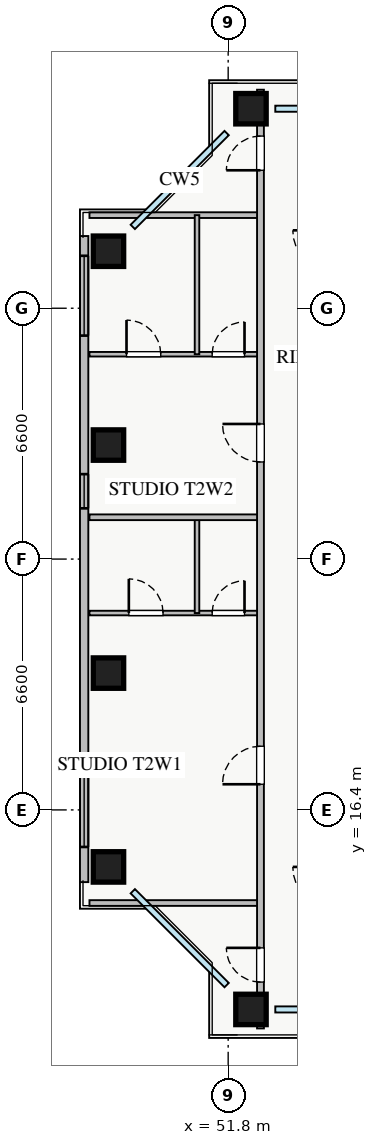
"""IFC4 building model, lengths in metres.
Left out: names, types, materials, properties, quantities, classifications, styles, units other than length and angle.
Written with IfcOpenShell. Run it as: python <this file> out.ifc"""

import sys

from ifc_helpers import new_model, si_unit, direction, frame, frame_2d, origin, origin_2d, place, context, subcontext, project, spatial, rectangle, extrude, source, transform, mapped, element, fill, save


model = new_model("IFC4")
c1 = context("Model", 3, precision=1e-05, world=origin(), true_north=direction((0.0, 1.0)))
c2 = subcontext(c1, "Body", "Model", "MODEL_VIEW")
j1 = project(units=[si_unit("LENGTHUNIT", "METRE"), si_unit("PLANEANGLEUNIT", "RADIAN")], contexts=[c1])
p1 = place(None, origin())
s1 = spatial("IfcSite", under=j1, at=p1, CompositionType="ELEMENT")
p2 = place(p1, origin())
s2 = spatial("IfcBuilding", under=s1, at=p2, CompositionType="ELEMENT")
p3 = place(p2, frame((0.0, 0.0, 103.5)))
s3 = spatial("IfcBuildingStorey", under=s2, at=p3, CompositionType="ELEMENT", Elevation=103.5)
m1 = source(origin(), c2, "Body", "SweptSolid", [
    extrude(rectangle(XDim=0.8, YDim=0.8, at=origin_2d()), origin(), (0.0, 0.0, 1.0), 3.25),
])
for number, where, z_axis, x_axis in (
    (1, (52.4, 11.15, 0.0), (0.0, 0.0, 1.0), (1.0, 0.0, 0.0)),
    (2, (52.4, 34.85, 0.0), (0.0, 0.0, 1.0), (1.0, 0.0, 0.0)),
    (3, (48.65, 14.9, 0.0), (0.0, 0.0, 1.0), (1.0, 0.0, 0.0)),
    (4, (48.65, 20.0, 0.0), (0.0, 0.0, 1.0), (1.0, 0.0, 0.0)),
    (5, (48.65, 26.0, 0.0), (0.0, 0.0, 1.0), (1.0, 0.0, 0.0)),
    (6, (48.65, 31.1, 0.0), (0.0, 0.0, 1.0), (1.0, 0.0, 0.0)),
):
    element("IfcColumn", number, at=place(p3, frame(where, z_axis=z_axis, x_axis=x_axis)), inside=s3, PredefinedType="COLUMN", context=c2, shape_type="MappedRepresentation", body=[
        mapped(m1, transform((0.0, 0.0, 0.0), x_axis=(1.0, 0.0, 0.0), y_axis=(0.0, 1.0, 0.0), z_axis=(0.0, 0.0, 1.0), scale=1.0)),
    ])
p4 = place(p3, frame((48.01, 14.5, 0.0), z_axis=(0.0, 0.0, 1.0), x_axis=(0.0, 1.0, 0.0)))
e7 = element("IfcWall", 7, at=p4, inside=s3, PredefinedType="STANDARD", context=c2, shape_type="SweptSolid", body=[
    extrude(rectangle(XDim=17.0, YDim=0.22, at=frame_2d((8.5, 0.0))), origin(), (0.0, 0.0, 1.0), 2.61),
])
p5 = place(p4, frame((0.925, 0.0, 0.9)))
e8 = element("IfcOpeningElement", 8, at=p5, cuts=e7, PredefinedType="OPENING", context=c2, shape_type="SweptSolid", body=[
    extrude(rectangle(XDim=2.4, YDim=1.48, at=frame_2d((1.2, 0.74))), frame((0.0, 0.12, 0.0), z_axis=(0.0, -1.0, 0.0), x_axis=(1.0, 0.0, 0.0)), (0.0, 0.0, 1.0), 0.24),
])
p6 = place(p4, frame((14.38, 0.0, 0.9)))
e9 = element("IfcOpeningElement", 9, at=p6, cuts=e7, PredefinedType="OPENING", context=c2, shape_type="SweptSolid", body=[
    extrude(rectangle(XDim=2.1, YDim=1.5, at=frame_2d((1.05, 0.75))), frame((0.0, 0.12, 0.0), z_axis=(0.0, -1.0, 0.0), x_axis=(1.0, 0.0, 0.0)), (0.0, 0.0, 1.0), 0.24),
])
p7 = place(p4, frame((9.835, 0.0, 0.9)))
e10 = element("IfcOpeningElement", 10, at=p7, cuts=e7, PredefinedType="OPENING", context=c2, shape_type="SweptSolid", body=[
    extrude(rectangle(XDim=0.9, YDim=1.2, at=frame_2d((0.45, 0.6))), frame((0.0, 0.12, 0.0), z_axis=(0.0, -1.0, 0.0), x_axis=(1.0, 0.0, 0.0)), (0.0, 0.0, 1.0), 0.24),
])
for number, where, z_axis, x_axis in (
    (11, (48.15, 32.05, 0.0), (0.0, 0.0, 1.0), (1.0, 0.0, 0.0)),
    (12, (48.15, 13.95, 0.0), (0.0, 0.0, 1.0), (1.0, 0.0, 0.0)),
):
    element("IfcWall", number, at=place(p3, frame(where, z_axis=z_axis, x_axis=x_axis)), inside=s3, PredefinedType="PARTITIONING", context=c2, shape_type="SweptSolid", body=[
        extrude(rectangle(XDim=4.5, YDim=0.15, at=frame_2d((2.25, 0.0))), origin(), (0.0, 0.0, 1.0), 3.07),
    ])
p8 = place(p3, frame((48.15, 21.58, 0.0), z_axis=(0.0, 0.0, 1.0), x_axis=(1.0, 0.0, 0.0)))
e13 = element("IfcWall", 13, at=p8, inside=s3, PredefinedType="PLUMBINGWALL", context=c2, shape_type="SweptSolid", body=[
    extrude(rectangle(XDim=4.5, YDim=0.12, at=frame_2d((2.25, 0.0))), origin(), (0.0, 0.0, 1.0), 3.07),
])
p9 = place(p8, frame((1.036, 0.0, 0.0)))
e14 = element("IfcOpeningElement", 14, at=p9, cuts=e13, PredefinedType="OPENING", context=c2, shape_type="SweptSolid", body=[
    extrude(rectangle(XDim=0.9, YDim=2.05, at=frame_2d((0.45, 1.025))), frame((0.0, 0.07, 0.0), z_axis=(0.0, -1.0, 0.0), x_axis=(1.0, 0.0, 0.0)), (0.0, 0.0, 1.0), 0.14),
])
p10 = place(p8, frame((3.23, 0.0, 0.0)))
e15 = element("IfcOpeningElement", 15, at=p10, cuts=e13, PredefinedType="OPENING", context=c2, shape_type="SweptSolid", body=[
    extrude(rectangle(XDim=0.85, YDim=2.05, at=frame_2d((0.425, 1.025))), frame((0.0, 0.07, 0.0), z_axis=(0.0, -1.0, 0.0), x_axis=(1.0, 0.0, 0.0)), (0.0, 0.0, 1.0), 0.14),
])
p11 = place(p3, frame((50.98, 21.58, 0.0), z_axis=(0.0, 0.0, 1.0), x_axis=(0.0, 1.0, 0.0)))
e16 = element("IfcWall", 16, at=p11, inside=s3, PredefinedType="PLUMBINGWALL", context=c2, shape_type="SweptSolid", body=[
    extrude(rectangle(XDim=2.52, YDim=0.12, at=frame_2d((1.26, 0.0))), origin(), (0.0, 0.0, 1.0), 3.07),
])
p12 = place(p3, frame((48.15, 28.39, 0.0), z_axis=(0.0, 0.0, 1.0), x_axis=(1.0, 0.0, 0.0)))
e17 = element("IfcWall", 17, at=p12, inside=s3, PredefinedType="PLUMBINGWALL", context=c2, shape_type="SweptSolid", body=[
    extrude(rectangle(XDim=4.5, YDim=0.12, at=frame_2d((2.25, 0.0))), origin(), (0.0, 0.0, 1.0), 3.07),
])
p13 = place(p12, frame((0.975, 0.0, 0.0)))
e18 = element("IfcOpeningElement", 18, at=p13, cuts=e17, PredefinedType="OPENING", context=c2, shape_type="SweptSolid", body=[
    extrude(rectangle(XDim=0.9, YDim=2.05, at=frame_2d((0.45, 1.025))), frame((0.0, 0.07, 0.0), z_axis=(0.0, -1.0, 0.0), x_axis=(1.0, 0.0, 0.0)), (0.0, 0.0, 1.0), 0.14),
])
p14 = place(p12, frame((3.23, 0.0, 0.0)))
e19 = element("IfcOpeningElement", 19, at=p14, cuts=e17, PredefinedType="OPENING", context=c2, shape_type="SweptSolid", body=[
    extrude(rectangle(XDim=0.85, YDim=2.05, at=frame_2d((0.425, 1.025))), frame((0.0, 0.07, 0.0), z_axis=(0.0, -1.0, 0.0), x_axis=(1.0, 0.0, 0.0)), (0.0, 0.0, 1.0), 0.14),
])
p15 = place(p3, frame((50.98, 28.39, 0.0), z_axis=(0.0, 0.0, 1.0), x_axis=(0.0, 1.0, 0.0)))
e20 = element("IfcWall", 20, at=p15, inside=s3, PredefinedType="PLUMBINGWALL", context=c2, shape_type="SweptSolid", body=[
    extrude(rectangle(XDim=3.66, YDim=0.12, at=frame_2d((1.83, 0.0))), origin(), (0.0, 0.0, 1.0), 3.07),
])
p16 = place(p3, frame((48.15, 24.1, 0.0), z_axis=(0.0, 0.0, 1.0), x_axis=(1.0, 0.0, 0.0)))
e21 = element("IfcWall", 21, at=p16, inside=s3, PredefinedType="PARTITIONING", context=c2, shape_type="SweptSolid", body=[
    extrude(rectangle(XDim=4.5, YDim=0.15, at=frame_2d((2.25, 0.0))), origin(), (0.0, 0.0, 1.0), 3.07),
])
p17 = place(p3, frame((52.65, 10.65, 0.0), z_axis=(0.0, 0.0, 1.0), x_axis=(0.0, 1.0, 0.0)))
e22 = element("IfcWall", 22, at=p17, inside=s3, PredefinedType="PARTITIONING", context=c2, shape_type="SweptSolid", body=[
    extrude(rectangle(XDim=24.7, YDim=0.18, at=frame_2d((12.35, 0.0))), origin(), (0.0, 0.0, 1.0), 2.615),
])
p18 = place(p17, frame((22.58, 0.0, 0.0)))
e23 = element("IfcOpeningElement", 23, at=p18, cuts=e22, PredefinedType="OPENING", context=c2, shape_type="SweptSolid", body=[
    extrude(rectangle(XDim=0.9, YDim=2.05, at=frame_2d((0.45, 1.025))), frame((0.0, 0.1, 0.0), z_axis=(0.0, -1.0, 0.0), x_axis=(1.0, 0.0, 0.0)), (0.0, 0.0, 1.0), 0.2),
])
p19 = place(p17, frame((1.22, 0.0, 0.0)))
e24 = element("IfcOpeningElement", 24, at=p19, cuts=e22, PredefinedType="OPENING", context=c2, shape_type="SweptSolid", body=[
    extrude(rectangle(XDim=0.9, YDim=2.05, at=frame_2d((0.45, 1.025))), frame((0.0, 0.1, 0.0), z_axis=(0.0, -1.0, 0.0), x_axis=(1.0, 0.0, 0.0)), (0.0, 0.0, 1.0), 0.2),
])
p20 = place(p17, frame((6.425, 0.0, 0.0)))
e25 = element("IfcOpeningElement", 25, at=p20, cuts=e22, PredefinedType="OPENING", context=c2, shape_type="SweptSolid", body=[
    extrude(rectangle(XDim=1.0, YDim=2.05, at=frame_2d((0.5, 1.025))), frame((0.0, 0.1, 0.0), z_axis=(0.0, -1.0, 0.0), x_axis=(1.0, 0.0, 0.0)), (0.0, 0.0, 1.0), 0.2),
])
p21 = place(p17, frame((14.905, 0.0, 0.0)))
e26 = element("IfcOpeningElement", 26, at=p21, cuts=e22, PredefinedType="OPENING", context=c2, shape_type="SweptSolid", body=[
    extrude(rectangle(XDim=1.0, YDim=2.05, at=frame_2d((0.5, 1.025))), frame((0.0, 0.1, 0.0), z_axis=(0.0, -1.0, 0.0), x_axis=(1.0, 0.0, 0.0)), (0.0, 0.0, 1.0), 0.2),
])
m2 = source(origin(), c2, "Body", "SweptSolid", [
    extrude(rectangle(XDim=2.4, YDim=1.48, at=frame_2d((1.2, 0.74))), frame((0.0, 0.03, 0.0), z_axis=(0.0, -1.0, 0.0), x_axis=(1.0, 0.0, 0.0)), (0.0, 0.0, 1.0), 0.06),
])
p22 = place(p5, origin())
e27 = element("IfcWindow", 27, at=p22, inside=s3, PartitioningType="TRIPLE_PANEL_VERTICAL", PredefinedType="WINDOW", context=c2, shape_type="MappedRepresentation", body=[
    mapped(m2, transform((0.0, 0.0, 0.0), x_axis=(1.0, 0.0, 0.0), y_axis=(0.0, 1.0, 0.0), z_axis=(0.0, 0.0, 1.0), scale=1.0)),
])
fill(e8, e27)
m3 = source(origin(), c2, "Body", "SweptSolid", [
    extrude(rectangle(XDim=2.1, YDim=1.5, at=frame_2d((1.05, 0.75))), frame((0.0, 0.03, 0.0), z_axis=(0.0, -1.0, 0.0), x_axis=(1.0, 0.0, 0.0)), (0.0, 0.0, 1.0), 0.06),
])
p23 = place(p6, origin())
e28 = element("IfcWindow", 28, at=p23, inside=s3, PartitioningType="TRIPLE_PANEL_VERTICAL", PredefinedType="WINDOW", context=c2, shape_type="MappedRepresentation", body=[
    mapped(m3, transform((0.0, 0.0, 0.0), x_axis=(1.0, 0.0, 0.0), y_axis=(0.0, 1.0, 0.0), z_axis=(0.0, 0.0, 1.0), scale=1.0)),
])
fill(e9, e28)
m4 = source(origin(), c2, "Body", "SweptSolid", [
    extrude(rectangle(XDim=0.9, YDim=2.05, at=frame_2d((0.45, 1.025))), frame((0.0, 0.025, 0.0), z_axis=(0.0, -1.0, 0.0), x_axis=(1.0, 0.0, 0.0)), (0.0, 0.0, 1.0), 0.05),
])
p24 = place(p9, origin())
e29 = element("IfcDoor", 29, at=p24, inside=s3, OperationType="SINGLE_SWING_LEFT", PredefinedType="DOOR", context=c2, shape_type="MappedRepresentation", body=[
    mapped(m4, transform((0.0, 0.0, 0.0), x_axis=(1.0, 0.0, 0.0), y_axis=(0.0, 1.0, 0.0), z_axis=(0.0, 0.0, 1.0), scale=1.0)),
])
fill(e14, e29)
m5 = source(origin(), c2, "Body", "SweptSolid", [
    extrude(rectangle(XDim=0.85, YDim=2.05, at=frame_2d((0.425, 1.025))), frame((0.0, 0.025, 0.0), z_axis=(0.0, -1.0, 0.0), x_axis=(1.0, 0.0, 0.0)), (0.0, 0.0, 1.0), 0.05),
])
p25 = place(p10, origin())
e30 = element("IfcDoor", 30, at=p25, inside=s3, OperationType="SINGLE_SWING_RIGHT", PredefinedType="DOOR", context=c2, shape_type="MappedRepresentation", body=[
    mapped(m5, transform((0.0, 0.0, 0.0), x_axis=(1.0, 0.0, 0.0), y_axis=(0.0, 1.0, 0.0), z_axis=(0.0, 0.0, 1.0), scale=1.0)),
])
fill(e15, e30)
p26 = place(p13, origin())
e31 = element("IfcDoor", 31, at=p26, inside=s3, OperationType="SINGLE_SWING_LEFT", PredefinedType="DOOR", context=c2, shape_type="MappedRepresentation", body=[
    mapped(m4, transform((0.0, 0.0, 0.0), x_axis=(1.0, 0.0, 0.0), y_axis=(0.0, 1.0, 0.0), z_axis=(0.0, 0.0, 1.0), scale=1.0)),
])
fill(e18, e31)
p27 = place(p14, origin())
e32 = element("IfcDoor", 32, at=p27, inside=s3, OperationType="SINGLE_SWING_RIGHT", PredefinedType="DOOR", context=c2, shape_type="MappedRepresentation", body=[
    mapped(m5, transform((0.0, 0.0, 0.0), x_axis=(1.0, 0.0, 0.0), y_axis=(0.0, 1.0, 0.0), z_axis=(0.0, 0.0, 1.0), scale=1.0)),
])
fill(e19, e32)
p28 = place(p18, origin())
e33 = element("IfcDoor", 33, at=p28, inside=s3, OperationType="SINGLE_SWING_LEFT", PredefinedType="DOOR", context=c2, shape_type="MappedRepresentation", body=[
    mapped(m4, transform((0.0, 0.0, 0.0), x_axis=(1.0, 0.0, 0.0), y_axis=(0.0, 1.0, 0.0), z_axis=(0.0, 0.0, 1.0), scale=1.0)),
])
fill(e23, e33)
p29 = place(p19, origin())
e34 = element("IfcDoor", 34, at=p29, inside=s3, OperationType="SINGLE_SWING_RIGHT", PredefinedType="DOOR", context=c2, shape_type="MappedRepresentation", body=[
    mapped(m4, transform((0.0, 0.0, 0.0), x_axis=(1.0, 0.0, 0.0), y_axis=(0.0, 1.0, 0.0), z_axis=(0.0, 0.0, 1.0), scale=1.0)),
])
fill(e24, e34)
m6 = source(origin(), c2, "Body", "SweptSolid", [
    extrude(rectangle(XDim=1.0, YDim=2.05, at=frame_2d((0.5, 1.025))), frame((0.0, 0.025, 0.0), z_axis=(0.0, -1.0, 0.0), x_axis=(1.0, 0.0, 0.0)), (0.0, 0.0, 1.0), 0.05),
])
p30 = place(p20, origin())
e35 = element("IfcDoor", 35, at=p30, inside=s3, OperationType="SINGLE_SWING_LEFT", PredefinedType="DOOR", context=c2, shape_type="MappedRepresentation", body=[
    mapped(m6, transform((0.0, 0.0, 0.0), x_axis=(1.0, 0.0, 0.0), y_axis=(0.0, 1.0, 0.0), z_axis=(0.0, 0.0, 1.0), scale=1.0)),
])
fill(e25, e35)
p31 = place(p21, origin())
e36 = element("IfcDoor", 36, at=p31, inside=s3, OperationType="SINGLE_SWING_RIGHT", PredefinedType="DOOR", context=c2, shape_type="MappedRepresentation", body=[
    mapped(m6, transform((0.0, 0.0, 0.0), x_axis=(1.0, 0.0, 0.0), y_axis=(0.0, 1.0, 0.0), z_axis=(0.0, 0.0, 1.0), scale=1.0)),
])
fill(e26, e36)
m7 = source(origin(), c2, "Body", "SweptSolid", [
    extrude(rectangle(XDim=0.9, YDim=1.2, at=frame_2d((0.45, 0.6))), frame((0.0, 0.03, 0.0), z_axis=(0.0, -1.0, 0.0), x_axis=(1.0, 0.0, 0.0)), (0.0, 0.0, 1.0), 0.06),
])
p32 = place(p7, origin())
e37 = element("IfcWindow", 37, at=p32, inside=s3, PartitioningType="SINGLE_PANEL", PredefinedType="WINDOW", context=c2, shape_type="MappedRepresentation", body=[
    mapped(m7, transform((0.0, 0.0, 0.0), x_axis=(1.0, 0.0, 0.0), y_axis=(0.0, 1.0, 0.0), z_axis=(0.0, 0.0, 1.0), scale=1.0)),
])
fill(e10, e37)
save(model, sys.argv[1])
